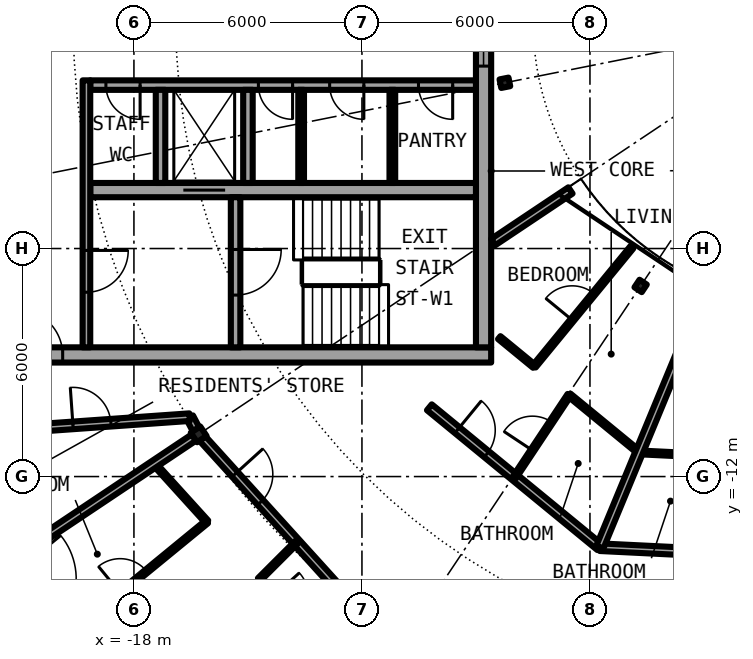
"""IFC4 building model, lengths in metres.
Left out: names, types, materials, properties, quantities, classifications, styles, units other than length and angle.
Written with IfcOpenShell. Run it as: python <this file> out.ifc"""

import sys

from ifc_helpers import new_model, si_unit, direction, frame, frame_2d, origin, origin_2d, place, context, subcontext, project, spatial, rectangle, i_section, extrude, element, fill, save


model = new_model("IFC4")
c1 = context("Model", 3, precision=1e-05, world=origin(), true_north=direction((0.0, 1.0)))
c2 = subcontext(c1, "Body", "Model", "MODEL_VIEW")
j1 = project(units=[si_unit("LENGTHUNIT", "METRE"), si_unit("PLANEANGLEUNIT", "RADIAN")], contexts=[c1])
p1 = place(None, origin())
s1 = spatial("IfcSite", under=j1, at=p1, CompositionType="ELEMENT")
p2 = place(p1, origin())
s2 = spatial("IfcBuilding", under=s1, at=p2, CompositionType="ELEMENT")
p3 = place(p2, frame((0.0, 0.0, 237.1)))
s3 = spatial("IfcBuildingStorey", under=s2, at=p3, CompositionType="ELEMENT", Elevation=237.1)
p4 = place(p3, frame((-16.297, -10.889, 0.0), z_axis=(0.0, 0.0, 1.0), x_axis=(-0.831469612303, -0.55557023302, 0.0)))
e1 = element("IfcColumn", 1, at=p4, inside=s3, PredefinedType="COLUMN", context=c2, shape_type="SweptSolid", body=[
    extrude(i_section(OverallWidth=0.3, OverallDepth=0.3, WebThickness=0.011, FlangeThickness=0.019, FilletRadius=0.027, at=origin_2d()), origin(), (0.0, 0.0, 1.0), 3.05),
])
for number, where, z_axis, x_axis in (
    (2, (-8.239, -1.639, 0.0), (0.0, 0.0, 1.0), (-0.981, -0.195, 0.0)),
    (3, (-4.667, -6.984, 0.0), (0.0, 0.0, 1.0), (-0.556, -0.831, 0.0)),
):
    element("IfcColumn", number, at=place(p3, frame(where, z_axis=z_axis, x_axis=x_axis)), inside=s3, PredefinedType="COLUMN", context=c2, shape_type="SweptSolid", body=[
        extrude(i_section(OverallWidth=0.24, OverallDepth=0.23, WebThickness=0.008, FlangeThickness=0.012, FilletRadius=0.021, at=origin_2d()), origin(), (0.0, 0.0, 1.0), 3.05),
    ])
p5 = place(p3, frame((-21.556, -14.403, 0.0), z_axis=(0.0, 0.0, 1.0), x_axis=(0.63433059803, -0.77306189429, 0.0)))
e4 = element("IfcWall", 4, at=p5, inside=s3, PredefinedType="SOLIDWALL", context=c2, shape_type="SweptSolid", body=[
    extrude(rectangle(XDim=5.082, YDim=0.25, at=frame_2d((2.541, 0.0))), origin(), (0.0, 0.0, 1.0), 2.7),
])
p6 = place(p5, frame((0.374, 0.0, 0.0)))
e5 = element("IfcOpeningElement", 5, at=p6, cuts=e4, PredefinedType="OPENING", context=c2, shape_type="SweptSolid", body=[
    extrude(rectangle(XDim=1.8, YDim=2.2, at=frame_2d((0.9, 1.1))), frame((0.0, 0.135, 0.0), z_axis=(0.0, -1.0, 0.0), x_axis=(1.0, 0.0, 0.0)), (0.0, 0.0, 1.0), 0.27),
])
p7 = place(p5, frame((2.909, 0.0, 0.0)))
e6 = element("IfcOpeningElement", 6, at=p7, cuts=e4, PredefinedType="OPENING", context=c2, shape_type="SweptSolid", body=[
    extrude(rectangle(XDim=1.8, YDim=2.2, at=frame_2d((0.9, 1.1))), frame((0.0, 0.135, 0.0), z_axis=(0.0, -1.0, 0.0), x_axis=(1.0, 0.0, 0.0)), (0.0, 0.0, 1.0), 0.27),
])
p8 = place(p3, frame((-22.0, -8.8, 0.0), z_axis=(0.0, 0.0, 1.0), x_axis=(1.0, 0.0, 0.0)))
e7 = element("IfcWall", 7, at=p8, inside=s3, PredefinedType="SHEAR", context=c2, shape_type="SweptSolid", body=[
    extrude(rectangle(XDim=13.4, YDim=0.4, at=frame_2d((6.7, 0.0))), origin(), (0.0, 0.0, 1.0), 3.05),
])
p9 = place(p8, frame((0.925, 0.0, 0.0)))
e8 = element("IfcOpeningElement", 8, at=p9, cuts=e7, PredefinedType="OPENING", context=c2, shape_type="SweptSolid", body=[
    extrude(rectangle(XDim=1.2, YDim=2.3, at=frame_2d((0.6, 1.15))), frame((0.0, 0.21, 0.0), z_axis=(0.0, -1.0, 0.0), x_axis=(1.0, 0.0, 0.0)), (0.0, 0.0, 1.0), 0.42),
])
p10 = place(p3, frame((-8.8, 8.6, 0.0), z_axis=(0.0, 0.0, 1.0), x_axis=(0.0, -1.0, 0.0)))
e9 = element("IfcWall", 9, at=p10, inside=s3, PredefinedType="SHEAR", context=c2, shape_type="SweptSolid", body=[
    extrude(rectangle(XDim=17.2, YDim=0.4, at=frame_2d((8.6, 0.0))), origin(), (0.0, 0.0, 1.0), 3.05),
])
p11 = place(p10, frame((7.4, 0.0, 0.1)))
e10 = element("IfcOpeningElement", 10, at=p11, cuts=e9, PredefinedType="OPENING", context=c2, shape_type="SweptSolid", body=[
    extrude(rectangle(XDim=2.4, YDim=2.2, at=frame_2d((1.2, 1.1))), frame((0.0, 0.21, 0.0), z_axis=(0.0, -1.0, 0.0), x_axis=(1.0, 0.0, 0.0)), (0.0, 0.0, 1.0), 0.42),
])
p12 = place(p3, frame((-9.0, -1.7, 0.0), z_axis=(0.0, 0.0, 1.0), x_axis=(-1.0, 0.0, 0.0)))
e11 = element("IfcWall", 11, at=p12, inside=s3, PredefinedType="SHEAR", context=c2, shape_type="SweptSolid", body=[
    extrude(rectangle(XDim=10.15, YDim=0.25, at=frame_2d((5.075, 0.0))), origin(), (0.0, 0.0, 1.0), 3.05),
])
p13 = place(p12, frame((0.613, 0.0, 0.0)))
e12 = element("IfcOpeningElement", 12, at=p13, cuts=e11, PredefinedType="OPENING", context=c2, shape_type="SweptSolid", body=[
    extrude(rectangle(XDim=0.9, YDim=2.3, at=frame_2d((0.45, 1.15))), frame((0.0, 0.135, 0.0), z_axis=(0.0, -1.0, 0.0), x_axis=(1.0, 0.0, 0.0)), (0.0, 0.0, 1.0), 0.27),
])
p14 = place(p12, frame((2.95, 0.0, 0.0)))
e13 = element("IfcOpeningElement", 13, at=p14, cuts=e11, PredefinedType="OPENING", context=c2, shape_type="SweptSolid", body=[
    extrude(rectangle(XDim=0.9, YDim=2.3, at=frame_2d((0.45, 1.15))), frame((0.0, 0.135, 0.0), z_axis=(0.0, -1.0, 0.0), x_axis=(1.0, 0.0, 0.0)), (0.0, 0.0, 1.0), 0.27),
])
p15 = place(p12, frame((4.825, 0.0, 0.0)))
e14 = element("IfcOpeningElement", 14, at=p15, cuts=e11, PredefinedType="OPENING", context=c2, shape_type="SweptSolid", body=[
    extrude(rectangle(XDim=0.9, YDim=2.3, at=frame_2d((0.45, 1.15))), frame((0.0, 0.135, 0.0), z_axis=(0.0, -1.0, 0.0), x_axis=(1.0, 0.0, 0.0)), (0.0, 0.0, 1.0), 0.27),
])
p16 = place(p12, frame((8.837, 0.0, 0.0)))
e15 = element("IfcOpeningElement", 15, at=p16, cuts=e11, PredefinedType="OPENING", context=c2, shape_type="SweptSolid", body=[
    extrude(rectangle(XDim=0.9, YDim=2.3, at=frame_2d((0.45, 1.15))), frame((0.0, 0.135, 0.0), z_axis=(0.0, -1.0, 0.0), x_axis=(1.0, 0.0, 0.0)), (0.0, 0.0, 1.0), 0.27),
])
p17 = place(p3, frame((-9.0, -4.462, 0.0), z_axis=(0.0, 0.0, 1.0), x_axis=(-1.0, 0.0, 0.0)))
e16 = element("IfcWall", 16, at=p17, inside=s3, PredefinedType="SHEAR", context=c2, shape_type="SweptSolid", body=[
    extrude(rectangle(XDim=10.15, YDim=0.375, at=frame_2d((5.075, 0.0))), origin(), (0.0, 0.0, 1.0), 3.05),
])
p18 = place(p17, frame((6.6, 0.0, 0.0)))
e17 = element("IfcOpeningElement", 17, at=p18, cuts=e16, PredefinedType="OPENING", context=c2, shape_type="SweptSolid", body=[
    extrude(rectangle(XDim=1.1, YDim=2.3, at=frame_2d((0.55, 1.15))), frame((0.0, 0.198, 0.0), z_axis=(0.0, -1.0, 0.0), x_axis=(1.0, 0.0, 0.0)), (0.0, 0.0, 1.0), 0.395),
])
p19 = place(p3, frame((-15.325, -4.65, 0.0), z_axis=(0.0, 0.0, 1.0), x_axis=(0.0, -1.0, 0.0)))
e18 = element("IfcWall", 18, at=p19, inside=s3, PredefinedType="SHEAR", context=c2, shape_type="SweptSolid", body=[
    extrude(rectangle(XDim=3.95, YDim=0.25, at=frame_2d((1.975, 0.0))), origin(), (0.0, 0.0, 1.0), 3.05),
])
p20 = place(p19, frame((1.375, 0.0, 0.0)))
e19 = element("IfcOpeningElement", 19, at=p20, cuts=e18, PredefinedType="OPENING", context=c2, shape_type="SweptSolid", body=[
    extrude(rectangle(XDim=1.2, YDim=2.3, at=frame_2d((0.6, 1.15))), frame((0.0, 0.135, 0.0), z_axis=(0.0, -1.0, 0.0), x_axis=(1.0, 0.0, 0.0)), (0.0, 0.0, 1.0), 0.27),
])
for number, where, z_axis, x_axis in (
    (20, (-15.0, -1.825, 0.0), (0.0, 0.0, 1.0), (0.0, -1.0, 0.0)),
    (21, (-17.3, -1.825, 0.0), (0.0, 0.0, 1.0), (0.0, -1.0, 0.0)),
):
    element("IfcWall", number, at=place(p3, frame(where, z_axis=z_axis, x_axis=x_axis)), inside=s3, PredefinedType="SOLIDWALL", context=c2, shape_type="SweptSolid", body=[
        extrude(rectangle(XDim=2.45, YDim=0.25, at=frame_2d((1.225, 0.0))), origin(), (0.0, 0.0, 1.0), 2.7),
    ])
p21 = place(p3, frame((-19.25, -1.575, 0.0), z_axis=(0.0, 0.0, 1.0), x_axis=(0.0, -1.0, 0.0)))
e22 = element("IfcWall", 22, at=p21, inside=s3, PredefinedType="SOLIDWALL", context=c2, shape_type="SweptSolid", body=[
    extrude(rectangle(XDim=7.025, YDim=0.2, at=frame_2d((3.513, 0.0))), origin(), (0.0, 0.0, 1.0), 2.7),
])
p22 = place(p21, frame((4.475, 0.0, 0.0)))
e23 = element("IfcOpeningElement", 23, at=p22, cuts=e22, PredefinedType="OPENING", context=c2, shape_type="SweptSolid", body=[
    extrude(rectangle(XDim=1.1, YDim=2.3, at=frame_2d((0.55, 1.15))), frame((0.0, 0.11, 0.0), z_axis=(0.0, -1.0, 0.0), x_axis=(1.0, 0.0, 0.0)), (0.0, 0.0, 1.0), 0.22),
])
for number, where, z_axis, x_axis in (
    (24, (-11.2, -1.825, 0.0), (0.0, 0.0, 1.0), (0.0, -1.0, 0.0)),
    (25, (-13.6, -1.825, 0.0), (0.0, 0.0, 1.0), (0.0, -1.0, 0.0)),
):
    element("IfcWall", number, at=place(p3, frame(where, z_axis=z_axis, x_axis=x_axis)), inside=s3, PredefinedType="PARTITIONING", context=c2, shape_type="SweptSolid", body=[
        extrude(rectangle(XDim=2.45, YDim=0.15, at=frame_2d((1.225, 0.0))), origin(), (0.0, 0.0, 1.0), 2.7),
    ])
p23 = place(p3, frame((-17.462, -11.667, 0.0), z_axis=(0.0, 0.0, 1.0), x_axis=(0.671678456097, -0.74084279818, 0.0)))
e26 = element("IfcWall", 26, at=p23, inside=s3, PredefinedType="PARTITIONING", context=c2, shape_type="SweptSolid", body=[
    extrude(rectangle(XDim=2.054, YDim=0.1, at=frame_2d((1.027, 0.0))), origin(), (0.0, 0.0, 1.0), 2.7),
])
p24 = place(p3, frame((-14.702, -14.711, 0.0), z_axis=(0.0, 0.0, 1.0), x_axis=(0.671678456097, -0.74084279818, 0.0)))
e27 = element("IfcWall", 27, at=p24, inside=s3, PredefinedType="PARTITIONING", context=c2, shape_type="SweptSolid", body=[
    extrude(rectangle(XDim=2.054, YDim=0.1, at=frame_2d((1.027, 0.0))), origin(), (0.0, 0.0, 1.0), 2.7),
])
p25 = place(p24, frame((0.577, 0.0, 0.0)))
e28 = element("IfcOpeningElement", 28, at=p25, cuts=e27, PredefinedType="OPENING", context=c2, shape_type="SweptSolid", body=[
    extrude(rectangle(XDim=0.9, YDim=2.3, at=frame_2d((0.45, 1.15))), frame((0.0, 0.06, 0.0), z_axis=(0.0, -1.0, 0.0), x_axis=(1.0, 0.0, 0.0)), (0.0, 0.0, 1.0), 0.12),
])
p26 = place(p3, frame((-16.535, -10.437, 0.0), z_axis=(0.0, 0.0, 1.0), x_axis=(0.465802239822, -0.884888848035, 0.0)))
e29 = element("IfcWall", 29, at=p26, inside=s3, PredefinedType="PARTITIONING", context=c2, shape_type="SweptSolid", body=[
    extrude(rectangle(XDim=0.361, YDim=0.2, at=frame_2d((0.18, 0.0))), origin(), (0.0, 0.0, 1.0), 2.7),
])
p27 = place(p3, frame((-16.195, -11.002, 0.0), z_axis=(0.0, 0.0, 1.0), x_axis=(0.671619657805, -0.740896102871, 0.0)))
e30 = element("IfcWall", 30, at=p27, inside=s3, PredefinedType="PARTITIONING", context=c2, shape_type="SweptSolid", body=[
    extrude(rectangle(XDim=5.6, YDim=0.2, at=frame_2d((2.8, 0.0))), origin(), (0.0, 0.0, 1.0), 2.45),
])
p28 = place(p27, frame((1.265, 0.0, 0.0)))
e31 = element("IfcOpeningElement", 31, at=p28, cuts=e30, PredefinedType="OPENING", context=c2, shape_type="SweptSolid", body=[
    extrude(rectangle(XDim=1.0, YDim=2.3, at=frame_2d((0.5, 1.15))), frame((0.0, 0.11, 0.0), z_axis=(0.0, -1.0, 0.0), x_axis=(1.0, 0.0, 0.0)), (0.0, 0.0, 1.0), 0.22),
])
p29 = place(p3, frame((-10.226, -10.177, 0.0), z_axis=(0.0, 0.0, 1.0), x_axis=(0.773071783484, -0.634318545828, 0.0)))
e32 = element("IfcWall", 32, at=p29, inside=s3, PredefinedType="PARTITIONING", context=c2, shape_type="SweptSolid", body=[
    extrude(rectangle(XDim=5.803, YDim=0.2, at=frame_2d((2.901, 0.0))), origin(), (0.0, 0.0, 1.0), 2.7),
])
p30 = place(p29, frame((0.949, 0.0, 0.0)))
e33 = element("IfcOpeningElement", 33, at=p30, cuts=e32, PredefinedType="OPENING", context=c2, shape_type="SweptSolid", body=[
    extrude(rectangle(XDim=1.0, YDim=2.3, at=frame_2d((0.5, 1.15))), frame((0.0, 0.11, 0.0), z_axis=(0.0, -1.0, 0.0), x_axis=(1.0, 0.0, 0.0)), (0.0, 0.0, 1.0), 0.22),
])
p31 = place(p3, frame((-5.737, -13.859, 0.0), z_axis=(0.0, 0.0, 1.0), x_axis=(0.998799182242, -0.048991770265, 0.0)))
e34 = element("IfcWall", 34, at=p31, inside=s3, PredefinedType="PARTITIONING", context=c2, shape_type="SweptSolid", body=[
    extrude(rectangle(XDim=10.106, YDim=0.2, at=frame_2d((5.053, 0.0))), origin(), (0.0, 0.0, 1.0), 2.7),
])
p32 = place(p31, frame((3.828, 0.0, 0.0)))
e35 = element("IfcOpeningElement", 35, at=p32, cuts=e34, PredefinedType="OPENING", context=c2, shape_type="SweptSolid", body=[
    extrude(rectangle(XDim=1.0, YDim=2.3, at=frame_2d((0.5, 1.15))), frame((0.0, 0.11, 0.0), z_axis=(0.0, -1.0, 0.0), x_axis=(1.0, 0.0, 0.0)), (0.0, 0.0, 1.0), 0.22),
])
p33 = place(p3, frame((-8.387, -8.344, 0.0), z_axis=(0.0, 0.0, 1.0), x_axis=(0.772869802794, -0.634564628646, 0.0)))
e36 = element("IfcWall", 36, at=p33, inside=s3, PredefinedType="PARTITIONING", context=c2, shape_type="SweptSolid", body=[
    extrude(rectangle(XDim=1.192, YDim=0.1, at=frame_2d((0.596, 0.0))), origin(), (0.0, 0.0, 1.0), 2.7),
])
p34 = place(p3, frame((-6.547, -9.854, 0.0), z_axis=(0.0, 0.0, 1.0), x_axis=(0.773033390712, -0.634365333893, 0.0)))
e37 = element("IfcWall", 37, at=p34, inside=s3, PredefinedType="PARTITIONING", context=c2, shape_type="SweptSolid", body=[
    extrude(rectangle(XDim=2.38, YDim=0.1, at=frame_2d((1.19, 0.0))), origin(), (0.0, 0.0, 1.0), 2.7),
])
p35 = place(p3, frame((-4.707, -11.364, 0.0), z_axis=(0.0, 0.0, 1.0), x_axis=(0.998799958351, -0.048975945103, 0.0)))
e38 = element("IfcWall", 38, at=p35, inside=s3, PredefinedType="PARTITIONING", context=c2, shape_type="SweptSolid", body=[
    extrude(rectangle(XDim=2.368, YDim=0.1, at=frame_2d((1.184, 0.0))), origin(), (0.0, 0.0, 1.0), 2.7),
])
p36 = place(p3, frame((-21.675, -10.8, 0.0), z_axis=(0.0, 0.0, 1.0), x_axis=(0.997515141784, 0.070452408845, 0.0)))
e39 = element("IfcWall", 39, at=p36, inside=s3, PredefinedType="PARTITIONING", context=c2, shape_type="SweptSolid", body=[
    extrude(rectangle(XDim=5.153, YDim=0.2, at=frame_2d((2.576, 0.0))), origin(), (0.0, 0.0, 1.0), 2.7),
])
p37 = place(p36, frame((2.076, 0.0, 0.0)))
e40 = element("IfcOpeningElement", 40, at=p37, cuts=e39, PredefinedType="OPENING", context=c2, shape_type="SweptSolid", body=[
    extrude(rectangle(XDim=1.0, YDim=2.3, at=frame_2d((0.5, 1.15))), frame((0.0, 0.11, 0.0), z_axis=(0.0, -1.0, 0.0), x_axis=(1.0, 0.0, 0.0)), (0.0, 0.0, 1.0), 0.22),
])
p38 = place(p3, frame((-6.513, -4.472, 0.0), z_axis=(0.0, 0.0, 1.0), x_axis=(-0.831450132577, -0.555599385382, 0.0)))
e41 = element("IfcWall", 41, at=p38, inside=s3, PredefinedType="PARTITIONING", context=c2, shape_type="SweptSolid", body=[
    extrude(rectangle(XDim=2.443, YDim=0.2, at=frame_2d((1.221, 0.0))), origin(), (0.0, 0.0, 1.0), 2.7),
])
p39 = place(p3, frame((-20.788, -13.89, 0.0), z_axis=(0.0, 0.0, 1.0), x_axis=(0.831406006746, 0.555665413668, 0.0)))
e42 = element("IfcWall", 42, at=p39, inside=s3, PredefinedType="PARTITIONING", context=c2, shape_type="SweptSolid", body=[
    extrude(rectangle(XDim=5.251, YDim=0.2, at=frame_2d((2.625, 0.0))), origin(), (0.0, 0.0, 1.0), 2.7),
])
p40 = place(p3, frame((-19.949, -16.361, 0.0), z_axis=(0.0, 0.0, 1.0), x_axis=(0.773226150619, 0.634130365145, 0.0)))
e43 = element("IfcWall", 43, at=p40, inside=s3, PredefinedType="PARTITIONING", context=c2, shape_type="SweptSolid", body=[
    extrude(rectangle(XDim=5.002, YDim=0.1, at=frame_2d((2.501, 0.0))), origin(), (0.0, 0.0, 1.0), 2.7),
])
p41 = place(p40, frame((2.051, 0.0, 0.0)))
e44 = element("IfcOpeningElement", 44, at=p41, cuts=e43, PredefinedType="OPENING", context=c2, shape_type="SweptSolid", body=[
    extrude(rectangle(XDim=0.9, YDim=2.3, at=frame_2d((0.45, 1.15))), frame((0.0, 0.06, 0.0), z_axis=(0.0, -1.0, 0.0), x_axis=(1.0, 0.0, 0.0)), (0.0, 0.0, 1.0), 0.12),
])
p42 = place(p3, frame((-14.703, -14.71, 0.0), z_axis=(0.0, 0.0, 1.0), x_axis=(0.707458838269, 0.706754548733, 0.0)))
e45 = element("IfcWall", 45, at=p42, inside=s3, PredefinedType="PARTITIONING", context=c2, shape_type="SweptSolid", body=[
    extrude(rectangle(XDim=1.386, YDim=0.1, at=frame_2d((0.693, 0.0))), origin(), (0.0, 0.0, 1.0), 2.7),
])
p43 = place(p3, frame((-7.984, -12.017, 0.0), z_axis=(0.0, 0.0, 1.0), x_axis=(0.553289146762, 0.832989267683, 0.0)))
e46 = element("IfcWall", 46, at=p43, inside=s3, PredefinedType="PARTITIONING", context=c2, shape_type="SweptSolid", body=[
    extrude(rectangle(XDim=2.597, YDim=0.1, at=frame_2d((1.298, 0.0))), origin(), (0.0, 0.0, 1.0), 2.7),
])
p44 = place(p43, frame((0.848, 0.0, 0.0)))
e47 = element("IfcOpeningElement", 47, at=p44, cuts=e46, PredefinedType="OPENING", context=c2, shape_type="SweptSolid", body=[
    extrude(rectangle(XDim=0.9, YDim=2.3, at=frame_2d((0.45, 1.15))), frame((0.0, 0.06, 0.0), z_axis=(0.0, -1.0, 0.0), x_axis=(1.0, 0.0, 0.0)), (0.0, 0.0, 1.0), 0.12),
])
p45 = place(p3, frame((-7.467, -9.099, 0.0), z_axis=(0.0, 0.0, 1.0), x_axis=(0.634313840507, 0.773075644256, 0.0)))
e48 = element("IfcWall", 48, at=p45, inside=s3, PredefinedType="PARTITIONING", context=c2, shape_type="SweptSolid", body=[
    extrude(rectangle(XDim=4.05, YDim=0.1, at=frame_2d((2.025, 0.0))), origin(), (0.0, 0.0, 1.0), 2.7),
])
p46 = place(p45, frame((1.575, 0.0, 0.0)))
e49 = element("IfcOpeningElement", 49, at=p46, cuts=e48, PredefinedType="OPENING", context=c2, shape_type="SweptSolid", body=[
    extrude(rectangle(XDim=0.9, YDim=2.3, at=frame_2d((0.45, 1.15))), frame((0.0, 0.06, 0.0), z_axis=(0.0, -1.0, 0.0), x_axis=(1.0, 0.0, 0.0)), (0.0, 0.0, 1.0), 0.12),
])
p47 = place(p3, frame((-5.74, -13.858, 0.0), z_axis=(0.0, 0.0, 1.0), x_axis=(0.38267858248, 0.923881541385, 0.0)))
e50 = element("IfcWall", 50, at=p47, inside=s3, PredefinedType="PARTITIONING", context=c2, shape_type="SweptSolid", body=[
    extrude(rectangle(XDim=7.28, YDim=0.2, at=frame_2d((3.64, 0.0))), origin(), (0.0, 0.0, 1.0), 2.7),
])
p48 = place(p18, origin())
e51 = element("IfcDoor", 51, at=p48, inside=s3, OperationType="DOUBLE_DOOR_SLIDING", PredefinedType="DOOR", context=c2, shape_type="SweptSolid", body=[
    extrude(rectangle(XDim=1.1, YDim=2.3, at=frame_2d((0.55, 1.15))), frame((0.0, 0.025, 0.0), z_axis=(0.0, -1.0, 0.0), x_axis=(1.0, 0.0, 0.0)), (0.0, 0.0, 1.0), 0.05),
])
fill(e17, e51)
p49 = place(p13, origin())
e52 = element("IfcDoor", 52, at=p49, inside=s3, OperationType="SINGLE_SWING_RIGHT", PredefinedType="DOOR", context=c2, shape_type="SweptSolid", body=[
    extrude(rectangle(XDim=0.9, YDim=2.3, at=frame_2d((0.45, 1.15))), frame((0.0, 0.025, 0.0), z_axis=(0.0, -1.0, 0.0), x_axis=(1.0, 0.0, 0.0)), (0.0, 0.0, 1.0), 0.05),
])
fill(e12, e52)
p50 = place(p14, origin())
e53 = element("IfcDoor", 53, at=p50, inside=s3, OperationType="SINGLE_SWING_RIGHT", PredefinedType="DOOR", context=c2, shape_type="SweptSolid", body=[
    extrude(rectangle(XDim=0.9, YDim=2.3, at=frame_2d((0.45, 1.15))), frame((0.0, 0.025, 0.0), z_axis=(0.0, -1.0, 0.0), x_axis=(1.0, 0.0, 0.0)), (0.0, 0.0, 1.0), 0.05),
])
fill(e13, e53)
p51 = place(p15, origin())
e54 = element("IfcDoor", 54, at=p51, inside=s3, OperationType="SINGLE_SWING_LEFT", PredefinedType="DOOR", context=c2, shape_type="SweptSolid", body=[
    extrude(rectangle(XDim=0.9, YDim=2.3, at=frame_2d((0.45, 1.15))), frame((0.0, 0.025, 0.0), z_axis=(0.0, -1.0, 0.0), x_axis=(1.0, 0.0, 0.0)), (0.0, 0.0, 1.0), 0.05),
])
fill(e14, e54)
p52 = place(p16, origin())
e55 = element("IfcDoor", 55, at=p52, inside=s3, OperationType="SINGLE_SWING_LEFT", PredefinedType="DOOR", context=c2, shape_type="SweptSolid", body=[
    extrude(rectangle(XDim=0.9, YDim=2.3, at=frame_2d((0.45, 1.15))), frame((0.0, 0.025, 0.0), z_axis=(0.0, -1.0, 0.0), x_axis=(1.0, 0.0, 0.0)), (0.0, 0.0, 1.0), 0.05),
])
fill(e15, e55)
p53 = place(p20, origin())
e56 = element("IfcDoor", 56, at=p53, inside=s3, OperationType="SINGLE_SWING_LEFT", PredefinedType="DOOR", context=c2, shape_type="SweptSolid", body=[
    extrude(rectangle(XDim=1.2, YDim=2.3, at=frame_2d((0.6, 1.15))), frame((0.0, 0.025, 0.0), z_axis=(0.0, -1.0, 0.0), x_axis=(1.0, 0.0, 0.0)), (0.0, 0.0, 1.0), 0.05),
])
fill(e19, e56)
p54 = place(p22, origin())
e57 = element("IfcDoor", 57, at=p54, inside=s3, OperationType="SINGLE_SWING_LEFT", PredefinedType="DOOR", context=c2, shape_type="SweptSolid", body=[
    extrude(rectangle(XDim=1.1, YDim=2.3, at=frame_2d((0.55, 1.15))), frame((0.0, 0.025, 0.0), z_axis=(0.0, -1.0, 0.0), x_axis=(1.0, 0.0, 0.0)), (0.0, 0.0, 1.0), 0.05),
])
fill(e23, e57)
p55 = place(p9, origin())
e58 = element("IfcDoor", 58, at=p55, inside=s3, OperationType="SINGLE_SWING_RIGHT", PredefinedType="DOOR", context=c2, shape_type="SweptSolid", body=[
    extrude(rectangle(XDim=1.2, YDim=2.3, at=frame_2d((0.6, 1.15))), frame((0.0, 0.025, 0.0), z_axis=(0.0, -1.0, 0.0), x_axis=(1.0, 0.0, 0.0)), (0.0, 0.0, 1.0), 0.05),
])
fill(e8, e58)
p56 = place(p11, origin())
e59 = element("IfcWindow", 59, at=p56, inside=s3, PartitioningType="SINGLE_PANEL", PredefinedType="WINDOW", context=c2, shape_type="SweptSolid", body=[
    extrude(rectangle(XDim=2.4, YDim=2.2, at=frame_2d((1.2, 1.1))), frame((0.0, 0.03, 0.0), z_axis=(0.0, -1.0, 0.0), x_axis=(1.0, 0.0, 0.0)), (0.0, 0.0, 1.0), 0.06),
])
fill(e10, e59)
p57 = place(p28, origin())
e60 = element("IfcDoor", 60, at=p57, inside=s3, OperationType="SINGLE_SWING_LEFT", PredefinedType="DOOR", context=c2, shape_type="SweptSolid", body=[
    extrude(rectangle(XDim=1.0, YDim=2.3, at=frame_2d((0.5, 1.15))), frame((0.0, 0.025, 0.0), z_axis=(0.0, -1.0, 0.0), x_axis=(1.0, 0.0, 0.0)), (0.0, 0.0, 1.0), 0.05),
])
fill(e31, e60)
p58 = place(p41, origin())
e61 = element("IfcDoor", 61, at=p58, inside=s3, OperationType="SINGLE_SWING_RIGHT", PredefinedType="DOOR", context=c2, shape_type="SweptSolid", body=[
    extrude(rectangle(XDim=0.9, YDim=2.3, at=frame_2d((0.45, 1.15))), frame((0.0, 0.025, 0.0), z_axis=(0.0, -1.0, 0.0), x_axis=(1.0, 0.0, 0.0)), (0.0, 0.0, 1.0), 0.05),
])
fill(e44, e61)
p59 = place(p30, origin())
e62 = element("IfcDoor", 62, at=p59, inside=s3, OperationType="SINGLE_SWING_LEFT", PredefinedType="DOOR", context=c2, shape_type="SweptSolid", body=[
    extrude(rectangle(XDim=1.0, YDim=2.3, at=frame_2d((0.5, 1.15))), frame((0.0, 0.025, 0.0), z_axis=(0.0, -1.0, 0.0), x_axis=(1.0, 0.0, 0.0)), (0.0, 0.0, 1.0), 0.05),
])
fill(e33, e62)
p60 = place(p44, origin())
e63 = element("IfcDoor", 63, at=p60, inside=s3, OperationType="SINGLE_SWING_RIGHT", PredefinedType="DOOR", context=c2, shape_type="SweptSolid", body=[
    extrude(rectangle(XDim=0.9, YDim=2.3, at=frame_2d((0.45, 1.15))), frame((0.0, 0.025, 0.0), z_axis=(0.0, -1.0, 0.0), x_axis=(1.0, 0.0, 0.0)), (0.0, 0.0, 1.0), 0.05),
])
fill(e47, e63)
p61 = place(p46, origin())
e64 = element("IfcDoor", 64, at=p61, inside=s3, OperationType="SINGLE_SWING_RIGHT", PredefinedType="DOOR", context=c2, shape_type="SweptSolid", body=[
    extrude(rectangle(XDim=0.9, YDim=2.3, at=frame_2d((0.45, 1.15))), frame((0.0, 0.025, 0.0), z_axis=(0.0, -1.0, 0.0), x_axis=(1.0, 0.0, 0.0)), (0.0, 0.0, 1.0), 0.05),
])
fill(e49, e64)
p62 = place(p37, origin())
e65 = element("IfcDoor", 65, at=p62, inside=s3, OperationType="SINGLE_SWING_RIGHT", PredefinedType="DOOR", context=c2, shape_type="SweptSolid", body=[
    extrude(rectangle(XDim=1.0, YDim=2.3, at=frame_2d((0.5, 1.15))), frame((0.0, 0.025, 0.0), z_axis=(0.0, -1.0, 0.0), x_axis=(1.0, 0.0, 0.0)), (0.0, 0.0, 1.0), 0.05),
])
fill(e40, e65)
save(model, sys.argv[1])
